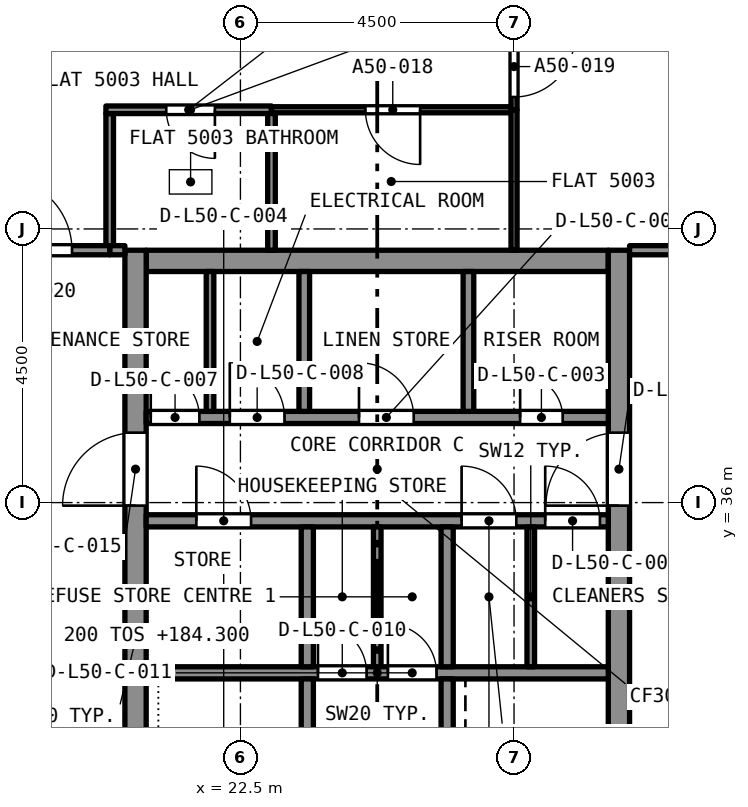
"""IFC4 building model, lengths in metres.
Left out: names, types, materials, properties, quantities, classifications, styles, units other than length and angle.
Written with IfcOpenShell. Run it as: python <this file> out.ifc"""

import sys

from ifc_helpers import new_model, si_unit, direction, frame, frame_2d, origin, place, context, subcontext, project, spatial, rectangle, extrude, element, fill, save


model = new_model("IFC4")
c1 = context("Model", 3, precision=1e-05, world=origin(), true_north=direction((0.0, 1.0)))
c2 = subcontext(c1, "Body", "Model", "MODEL_VIEW")
j1 = project(units=[si_unit("LENGTHUNIT", "METRE"), si_unit("PLANEANGLEUNIT", "RADIAN")], contexts=[c1])
p1 = place(None, origin())
s1 = spatial("IfcSite", under=j1, at=p1, CompositionType="ELEMENT")
p2 = place(p1, origin())
s2 = spatial("IfcBuilding", under=s1, at=p2, CompositionType="ELEMENT")
p3 = place(p2, frame((0.0, 0.0, 182.7)))
s3 = spatial("IfcBuildingStorey", under=s2, at=p3, CompositionType="ELEMENT", Elevation=182.7)
p4 = place(p3, frame((20.95, 39.975, 0.0), z_axis=(0.0, 0.0, 1.0), x_axis=(1.0, 0.0, 0.0)))
e1 = element("IfcWall", 1, at=p4, inside=s3, PredefinedType="SOLIDWALL", context=c2, shape_type="SweptSolid", body=[
    extrude(rectangle(XDim=7.6, YDim=0.35, at=frame_2d((3.8, 0.0))), origin(), (0.0, 0.0, 1.0), 3.2),
])
p5 = place(p3, frame((20.775, 27.35, 0.0), z_axis=(0.0, 0.0, 1.0), x_axis=(0.0, 1.0, 0.0)))
e2 = element("IfcWall", 2, at=p5, inside=s3, PredefinedType="SOLIDWALL", context=c2, shape_type="SweptSolid", body=[
    extrude(rectangle(XDim=12.8, YDim=0.35, at=frame_2d((6.4, 0.0))), origin(), (0.0, 0.0, 1.0), 3.2),
])
p6 = place(p5, frame((8.6, 0.0, 0.0)))
e3 = element("IfcOpeningElement", 3, at=p6, cuts=e2, PredefinedType="OPENING", context=c2, shape_type="SweptSolid", body=[
    extrude(rectangle(XDim=1.2, YDim=2.1, at=frame_2d((0.6, 1.05))), frame((0.0, 0.185, 0.0), z_axis=(0.0, -1.0, 0.0), x_axis=(1.0, 0.0, 0.0)), (0.0, 0.0, 1.0), 0.37),
])
p7 = place(p3, frame((28.725, 27.35, 0.0), z_axis=(0.0, 0.0, 1.0), x_axis=(0.0, 1.0, 0.0)))
e4 = element("IfcWall", 4, at=p7, inside=s3, PredefinedType="SOLIDWALL", context=c2, shape_type="SweptSolid", body=[
    extrude(rectangle(XDim=12.8, YDim=0.35, at=frame_2d((6.4, 0.0))), origin(), (0.0, 0.0, 1.0), 3.2),
])
p8 = place(p7, frame((8.6, 0.0, 0.0)))
e5 = element("IfcOpeningElement", 5, at=p8, cuts=e4, PredefinedType="OPENING", context=c2, shape_type="SweptSolid", body=[
    extrude(rectangle(XDim=1.2, YDim=2.1, at=frame_2d((0.6, 1.05))), frame((0.0, 0.185, 0.0), z_axis=(0.0, -1.0, 0.0), x_axis=(1.0, 0.0, 0.0)), (0.0, 0.0, 1.0), 0.37),
])
p9 = place(p3, frame((20.35, 40.225, 0.0), z_axis=(0.0, 0.0, 1.0), x_axis=(0.0, 1.0, 0.0)))
e6 = element("IfcWall", 6, at=p9, inside=s3, PredefinedType="PARTITIONING", context=c2, shape_type="SweptSolid", body=[
    extrude(rectangle(XDim=2.172, YDim=0.125, at=frame_2d((1.086, 0.0))), origin(), (0.0, 0.0, 1.0), 2.75),
])
p10 = place(p3, frame((23.011, 42.46, 0.0), z_axis=(0.0, 0.0, 1.0), x_axis=(-1.0, 0.0, 0.0)))
e7 = element("IfcWall", 7, at=p10, inside=s3, PredefinedType="PARTITIONING", context=c2, shape_type="SweptSolid", body=[
    extrude(rectangle(XDim=2.723, YDim=0.125, at=frame_2d((1.362, 0.0))), origin(), (0.0, 0.0, 1.0), 2.75),
])
p11 = place(p10, frame((0.93, 0.0, 0.0)))
e8 = element("IfcOpeningElement", 8, at=p11, cuts=e7, PredefinedType="OPENING", context=c2, shape_type="SweptSolid", body=[
    extrude(rectangle(XDim=0.8, YDim=2.1, at=frame_2d((0.4, 1.05))), frame((0.0, 0.073, 0.0), z_axis=(0.0, -1.0, 0.0), x_axis=(1.0, 0.0, 0.0)), (0.0, 0.0, 1.0), 0.145),
])
p12 = place(p3, frame((23.011, 40.15, 0.0), z_axis=(0.0, 0.0, 1.0), x_axis=(0.0, 1.0, 0.0)))
e9 = element("IfcWall", 9, at=p12, inside=s3, PredefinedType="PARTITIONING", context=c2, shape_type="SweptSolid", body=[
    extrude(rectangle(XDim=2.248, YDim=0.125, at=frame_2d((1.124, 0.0))), origin(), (0.0, 0.0, 1.0), 2.75),
])
p13 = place(p3, frame((20.35, 40.15, 0.0), z_axis=(0.0, 0.0, 1.0), x_axis=(1.0, 0.0, 0.0)))
e10 = element("IfcWall", 10, at=p13, inside=s3, PredefinedType="PARTITIONING", context=c2, shape_type="SweptSolid", body=[
    extrude(rectangle(XDim=0.25, YDim=0.15, at=frame_2d((0.125, 0.0))), origin(), (0.0, 0.0, 1.0), 2.75),
])
p14 = place(p3, frame((26.95, 42.46, 0.0), z_axis=(0.0, 0.0, 1.0), x_axis=(-1.0, 0.0, 0.0)))
e11 = element("IfcWall", 11, at=p14, inside=s3, PredefinedType="PARTITIONING", context=c2, shape_type="SweptSolid", body=[
    extrude(rectangle(XDim=3.939, YDim=0.1, at=frame_2d((1.97, 0.0))), origin(), (0.0, 0.0, 1.0), 2.75),
])
p15 = place(p14, frame((1.495, 0.0, 0.0)))
e12 = element("IfcOpeningElement", 12, at=p15, cuts=e11, PredefinedType="OPENING", context=c2, shape_type="SweptSolid", body=[
    extrude(rectangle(XDim=0.9, YDim=2.1, at=frame_2d((0.45, 1.05))), frame((0.0, 0.06, 0.0), z_axis=(0.0, -1.0, 0.0), x_axis=(1.0, 0.0, 0.0)), (0.0, 0.0, 1.0), 0.12),
])
p16 = place(p3, frame((27.0, 43.88, 0.0), z_axis=(0.0, 0.0, 1.0), x_axis=(0.0, -1.0, 0.0)))
e13 = element("IfcWall", 13, at=p16, inside=s3, PredefinedType="PARTITIONING", context=c2, shape_type="SweptSolid", body=[
    extrude(rectangle(XDim=1.42, YDim=0.1, at=frame_2d((0.71, 0.0))), origin(), (0.0, 0.0, 1.0), 2.75),
])
p17 = place(p16, frame((0.21, 0.0, 0.0)))
e14 = element("IfcOpeningElement", 14, at=p17, cuts=e13, PredefinedType="OPENING", context=c2, shape_type="SweptSolid", body=[
    extrude(rectangle(XDim=1.0, YDim=2.1, at=frame_2d((0.5, 1.05))), frame((0.0, 0.06, 0.0), z_axis=(0.0, -1.0, 0.0), x_axis=(1.0, 0.0, 0.0)), (0.0, 0.0, 1.0), 0.12),
])
p18 = place(p3, frame((18.4, 40.15, 0.0), z_axis=(0.0, 0.0, 1.0), x_axis=(1.0, 0.0, 0.0)))
e15 = element("IfcWall", 15, at=p18, inside=s3, PredefinedType="PARTITIONING", context=c2, shape_type="SweptSolid", body=[
    extrude(rectangle(XDim=1.95, YDim=0.15, at=frame_2d((0.975, 0.0))), origin(), (0.0, 0.0, 1.0), 2.75),
])
p19 = place(p18, frame((0.13, 0.0, 0.0)))
e16 = element("IfcOpeningElement", 16, at=p19, cuts=e15, PredefinedType="OPENING", context=c2, shape_type="SweptSolid", body=[
    extrude(rectangle(XDim=1.2, YDim=2.4, at=frame_2d((0.6, 1.2))), frame((0.0, 0.085, 0.0), z_axis=(0.0, -1.0, 0.0), x_axis=(1.0, 0.0, 0.0)), (0.0, 0.0, 1.0), 0.17),
])
p20 = place(p3, frame((27.0, 40.15, 0.0), z_axis=(0.0, 0.0, 1.0), x_axis=(0.0, 1.0, 0.0)))
e17 = element("IfcWall", 17, at=p20, inside=s3, PredefinedType="PARTITIONING", context=c2, shape_type="SweptSolid", body=[
    extrude(rectangle(XDim=2.31, YDim=0.1, at=frame_2d((1.155, 0.0))), origin(), (0.0, 0.0, 1.0), 2.75),
])
p21 = place(p3, frame((28.9, 40.15, 0.0), z_axis=(0.0, 0.0, 1.0), x_axis=(1.0, 0.0, 0.0)))
e18 = element("IfcWall", 18, at=p21, inside=s3, PredefinedType="PARTITIONING", context=c2, shape_type="SweptSolid", body=[
    extrude(rectangle(XDim=2.2, YDim=0.15, at=frame_2d((1.1, 0.0))), origin(), (0.0, 0.0, 1.0), 2.75),
])
p22 = place(p3, frame((20.95, 33.2, 0.0), z_axis=(0.0, 0.0, 1.0), x_axis=(1.0, 0.0, 0.0)))
e19 = element("IfcWall", 19, at=p22, inside=s3, PredefinedType="SOLIDWALL", context=c2, shape_type="SweptSolid", body=[
    extrude(rectangle(XDim=7.6, YDim=0.2, at=frame_2d((3.8, 0.0))), origin(), (0.0, 0.0, 1.0), 2.9),
])
p23 = place(p22, frame((2.825, 0.0, 0.0)))
e20 = element("IfcOpeningElement", 20, at=p23, cuts=e19, PredefinedType="OPENING", context=c2, shape_type="SweptSolid", body=[
    extrude(rectangle(XDim=0.8, YDim=2.1, at=frame_2d((0.4, 1.05))), frame((0.0, 0.11, 0.0), z_axis=(0.0, -1.0, 0.0), x_axis=(1.0, 0.0, 0.0)), (0.0, 0.0, 1.0), 0.22),
])
p24 = place(p22, frame((3.975, 0.0, 0.0)))
e21 = element("IfcOpeningElement", 21, at=p24, cuts=e19, PredefinedType="OPENING", context=c2, shape_type="SweptSolid", body=[
    extrude(rectangle(XDim=0.8, YDim=2.1, at=frame_2d((0.4, 1.05))), frame((0.0, 0.11, 0.0), z_axis=(0.0, -1.0, 0.0), x_axis=(1.0, 0.0, 0.0)), (0.0, 0.0, 1.0), 0.22),
])
p25 = place(p3, frame((20.95, 35.7, 0.0), z_axis=(0.0, 0.0, 1.0), x_axis=(1.0, 0.0, 0.0)))
e22 = element("IfcWall", 22, at=p25, inside=s3, PredefinedType="SOLIDWALL", context=c2, shape_type="SweptSolid", body=[
    extrude(rectangle(XDim=7.6, YDim=0.2, at=frame_2d((3.8, 0.0))), origin(), (0.0, 0.0, 1.0), 2.9),
])
p26 = place(p25, frame((0.825, 0.0, 0.0)))
e23 = element("IfcOpeningElement", 23, at=p26, cuts=e22, PredefinedType="OPENING", context=c2, shape_type="SweptSolid", body=[
    extrude(rectangle(XDim=0.9, YDim=2.1, at=frame_2d((0.45, 1.05))), frame((0.0, 0.11, 0.0), z_axis=(0.0, -1.0, 0.0), x_axis=(1.0, 0.0, 0.0)), (0.0, 0.0, 1.0), 0.22),
])
p27 = place(p25, frame((5.188, 0.0, 0.0)))
e24 = element("IfcOpeningElement", 24, at=p27, cuts=e22, PredefinedType="OPENING", context=c2, shape_type="SweptSolid", body=[
    extrude(rectangle(XDim=0.9, YDim=2.1, at=frame_2d((0.45, 1.05))), frame((0.0, 0.11, 0.0), z_axis=(0.0, -1.0, 0.0), x_axis=(1.0, 0.0, 0.0)), (0.0, 0.0, 1.0), 0.22),
])
p28 = place(p25, frame((6.562, 0.0, 0.0)))
e25 = element("IfcOpeningElement", 25, at=p28, cuts=e22, PredefinedType="OPENING", context=c2, shape_type="SweptSolid", body=[
    extrude(rectangle(XDim=0.9, YDim=2.1, at=frame_2d((0.45, 1.05))), frame((0.0, 0.11, 0.0), z_axis=(0.0, -1.0, 0.0), x_axis=(1.0, 0.0, 0.0)), (0.0, 0.0, 1.0), 0.22),
])
p29 = place(p3, frame((20.95, 37.4, 0.0), z_axis=(0.0, 0.0, 1.0), x_axis=(1.0, 0.0, 0.0)))
e26 = element("IfcWall", 26, at=p29, inside=s3, PredefinedType="SOLIDWALL", context=c2, shape_type="SweptSolid", body=[
    extrude(rectangle(XDim=7.6, YDim=0.2, at=frame_2d((3.8, 0.0))), origin(), (0.0, 0.0, 1.0), 2.9),
])
p30 = place(p29, frame((6.15, 0.0, 0.0)))
e27 = element("IfcOpeningElement", 27, at=p30, cuts=e26, PredefinedType="OPENING", context=c2, shape_type="SweptSolid", body=[
    extrude(rectangle(XDim=0.7, YDim=2.1, at=frame_2d((0.35, 1.05))), frame((0.0, 0.11, 0.0), z_axis=(0.0, -1.0, 0.0), x_axis=(1.0, 0.0, 0.0)), (0.0, 0.0, 1.0), 0.22),
])
p31 = place(p29, frame((0.075, 0.0, 0.0)))
e28 = element("IfcOpeningElement", 28, at=p31, cuts=e26, PredefinedType="OPENING", context=c2, shape_type="SweptSolid", body=[
    extrude(rectangle(XDim=0.8, YDim=2.1, at=frame_2d((0.4, 1.05))), frame((0.0, 0.11, 0.0), z_axis=(0.0, -1.0, 0.0), x_axis=(1.0, 0.0, 0.0)), (0.0, 0.0, 1.0), 0.22),
])
p32 = place(p29, frame((1.375, 0.0, 0.0)))
e29 = element("IfcOpeningElement", 29, at=p32, cuts=e26, PredefinedType="OPENING", context=c2, shape_type="SweptSolid", body=[
    extrude(rectangle(XDim=0.9, YDim=2.1, at=frame_2d((0.45, 1.05))), frame((0.0, 0.11, 0.0), z_axis=(0.0, -1.0, 0.0), x_axis=(1.0, 0.0, 0.0)), (0.0, 0.0, 1.0), 0.22),
])
p33 = place(p29, frame((3.5, 0.0, 0.0)))
e30 = element("IfcOpeningElement", 30, at=p33, cuts=e26, PredefinedType="OPENING", context=c2, shape_type="SweptSolid", body=[
    extrude(rectangle(XDim=0.9, YDim=2.1, at=frame_2d((0.45, 1.05))), frame((0.0, 0.11, 0.0), z_axis=(0.0, -1.0, 0.0), x_axis=(1.0, 0.0, 0.0)), (0.0, 0.0, 1.0), 0.22),
])
p34 = place(p3, frame((23.6, 27.7, 0.0), z_axis=(0.0, 0.0, 1.0), x_axis=(0.0, 1.0, 0.0)))
e31 = element("IfcWall", 31, at=p34, inside=s3, PredefinedType="SOLIDWALL", context=c2, shape_type="SweptSolid", body=[
    extrude(rectangle(XDim=5.4, YDim=0.2, at=frame_2d((2.7, 0.0))), origin(), (0.0, 0.0, 1.0), 2.9),
])
p35 = place(p34, frame((0.2, 0.0, 0.0)))
e32 = element("IfcOpeningElement", 32, at=p35, cuts=e31, PredefinedType="OPENING", context=c2, shape_type="SweptSolid", body=[
    extrude(rectangle(XDim=0.9, YDim=2.1, at=frame_2d((0.45, 1.05))), frame((0.0, 0.11, 0.0), z_axis=(0.0, -1.0, 0.0), x_axis=(1.0, 0.0, 0.0)), (0.0, 0.0, 1.0), 0.22),
])
p36 = place(p3, frame((25.9, 27.7, 0.0), z_axis=(0.0, 0.0, 1.0), x_axis=(0.0, 1.0, 0.0)))
e33 = element("IfcWall", 33, at=p36, inside=s3, PredefinedType="SOLIDWALL", context=c2, shape_type="SweptSolid", body=[
    extrude(rectangle(XDim=5.4, YDim=0.2, at=frame_2d((2.7, 0.0))), origin(), (0.0, 0.0, 1.0), 2.9),
])
p37 = place(p36, frame((0.2, 0.0, 0.0)))
e34 = element("IfcOpeningElement", 34, at=p37, cuts=e33, PredefinedType="OPENING", context=c2, shape_type="SweptSolid", body=[
    extrude(rectangle(XDim=0.9, YDim=2.1, at=frame_2d((0.45, 1.05))), frame((0.0, 0.11, 0.0), z_axis=(0.0, -1.0, 0.0), x_axis=(1.0, 0.0, 0.0)), (0.0, 0.0, 1.0), 0.22),
])
for number, where, z_axis, x_axis in (
    (35, (23.6, 33.3, 0.0), (0.0, 0.0, 1.0), (0.0, 1.0, 0.0)),
    (36, (25.9, 33.3, 0.0), (0.0, 0.0, 1.0), (0.0, 1.0, 0.0)),
):
    element("IfcWall", number, at=place(p3, frame(where, z_axis=z_axis, x_axis=x_axis)), inside=s3, PredefinedType="SOLIDWALL", context=c2, shape_type="SweptSolid", body=[
        extrude(rectangle(XDim=2.3, YDim=0.2, at=frame_2d((1.15, 0.0))), origin(), (0.0, 0.0, 1.0), 2.9),
    ])
for number, where, z_axis, x_axis in (
    (37, (23.55, 37.5, 0.0), (0.0, 0.0, 1.0), (0.0, 1.0, 0.0)),
    (38, (26.25, 37.5, 0.0), (0.0, 0.0, 1.0), (0.0, 1.0, 0.0)),
):
    element("IfcWall", number, at=place(p3, frame(where, z_axis=z_axis, x_axis=x_axis)), inside=s3, PredefinedType="SOLIDWALL", context=c2, shape_type="SweptSolid", body=[
        extrude(rectangle(XDim=2.3, YDim=0.175, at=frame_2d((1.15, 0.0))), origin(), (0.0, 0.0, 1.0), 2.9),
    ])
for number, where, z_axis, x_axis in (
    (39, (27.275, 33.3, 0.0), (0.0, 0.0, 1.0), (0.0, 1.0, 0.0)),
    (40, (22.0, 37.5, 0.0), (0.0, 0.0, 1.0), (0.0, 1.0, 0.0)),
    (41, (24.75, 33.3, 0.0), (0.0, 0.0, 1.0), (0.0, 1.0, 0.0)),
):
    element("IfcWall", number, at=place(p3, frame(where, z_axis=z_axis, x_axis=x_axis)), inside=s3, PredefinedType="PARTITIONING", context=c2, shape_type="SweptSolid", body=[
        extrude(rectangle(XDim=2.3, YDim=0.125, at=frame_2d((1.15, 0.0))), origin(), (0.0, 0.0, 1.0), 2.9),
    ])
p38 = place(p11, origin())
e42 = element("IfcDoor", 42, at=p38, inside=s3, OperationType="SINGLE_SWING_LEFT", PredefinedType="DOOR", context=c2, shape_type="SweptSolid", body=[
    extrude(rectangle(XDim=0.8, YDim=2.1, at=frame_2d((0.4, 1.05))), frame((0.0, 0.025, 0.0), z_axis=(0.0, -1.0, 0.0), x_axis=(1.0, 0.0, 0.0)), (0.0, 0.0, 1.0), 0.05),
])
fill(e8, e42)
p39 = place(p15, origin())
e43 = element("IfcDoor", 43, at=p39, inside=s3, OperationType="SINGLE_SWING_LEFT", PredefinedType="DOOR", context=c2, shape_type="SweptSolid", body=[
    extrude(rectangle(XDim=0.9, YDim=2.1, at=frame_2d((0.45, 1.05))), frame((0.0, 0.025, 0.0), z_axis=(0.0, -1.0, 0.0), x_axis=(1.0, 0.0, 0.0)), (0.0, 0.0, 1.0), 0.05),
])
fill(e12, e43)
p40 = place(p17, origin())
e44 = element("IfcDoor", 44, at=p40, inside=s3, OperationType="SINGLE_SWING_RIGHT", PredefinedType="DOOR", context=c2, shape_type="SweptSolid", body=[
    extrude(rectangle(XDim=1.0, YDim=2.1, at=frame_2d((0.5, 1.05))), frame((0.0, 0.025, 0.0), z_axis=(0.0, -1.0, 0.0), x_axis=(1.0, 0.0, 0.0)), (0.0, 0.0, 1.0), 0.05),
])
fill(e14, e44)
p41 = place(p19, origin())
e45 = element("IfcDoor", 45, at=p41, inside=s3, OperationType="SINGLE_SWING_LEFT", PredefinedType="DOOR", context=c2, shape_type="SweptSolid", body=[
    extrude(rectangle(XDim=1.2, YDim=2.4, at=frame_2d((0.6, 1.2))), frame((0.0, 0.025, 0.0), z_axis=(0.0, -1.0, 0.0), x_axis=(1.0, 0.0, 0.0)), (0.0, 0.0, 1.0), 0.05),
])
fill(e16, e45)
p42 = place(p30, origin())
e46 = element("IfcDoor", 46, at=p42, inside=s3, OperationType="SINGLE_SWING_LEFT", PredefinedType="DOOR", context=c2, shape_type="SweptSolid", body=[
    extrude(rectangle(XDim=0.7, YDim=2.1, at=frame_2d((0.35, 1.05))), frame((0.0, 0.025, 0.0), z_axis=(0.0, -1.0, 0.0), x_axis=(1.0, 0.0, 0.0)), (0.0, 0.0, 1.0), 0.05),
])
fill(e27, e46)
p43 = place(p26, origin())
e47 = element("IfcDoor", 47, at=p43, inside=s3, OperationType="SINGLE_SWING_LEFT", PredefinedType="DOOR", context=c2, shape_type="SweptSolid", body=[
    extrude(rectangle(XDim=0.9, YDim=2.1, at=frame_2d((0.45, 1.05))), frame((0.0, 0.025, 0.0), z_axis=(0.0, -1.0, 0.0), x_axis=(1.0, 0.0, 0.0)), (0.0, 0.0, 1.0), 0.05),
])
fill(e23, e47)
p44 = place(p27, origin())
e48 = element("IfcDoor", 48, at=p44, inside=s3, OperationType="SINGLE_SWING_LEFT", PredefinedType="DOOR", context=c2, shape_type="SweptSolid", body=[
    extrude(rectangle(XDim=0.9, YDim=2.1, at=frame_2d((0.45, 1.05))), frame((0.0, 0.025, 0.0), z_axis=(0.0, -1.0, 0.0), x_axis=(1.0, 0.0, 0.0)), (0.0, 0.0, 1.0), 0.05),
])
fill(e24, e48)
p45 = place(p28, origin())
e49 = element("IfcDoor", 49, at=p45, inside=s3, OperationType="SINGLE_SWING_LEFT", PredefinedType="DOOR", context=c2, shape_type="SweptSolid", body=[
    extrude(rectangle(XDim=0.9, YDim=2.1, at=frame_2d((0.45, 1.05))), frame((0.0, 0.025, 0.0), z_axis=(0.0, -1.0, 0.0), x_axis=(1.0, 0.0, 0.0)), (0.0, 0.0, 1.0), 0.05),
])
fill(e25, e49)
p46 = place(p31, origin())
e50 = element("IfcDoor", 50, at=p46, inside=s3, OperationType="SINGLE_SWING_LEFT", PredefinedType="DOOR", context=c2, shape_type="SweptSolid", body=[
    extrude(rectangle(XDim=0.8, YDim=2.1, at=frame_2d((0.4, 1.05))), frame((0.0, 0.025, 0.0), z_axis=(0.0, -1.0, 0.0), x_axis=(1.0, 0.0, 0.0)), (0.0, 0.0, 1.0), 0.05),
])
fill(e28, e50)
p47 = place(p32, origin())
e51 = element("IfcDoor", 51, at=p47, inside=s3, OperationType="SINGLE_SWING_LEFT", PredefinedType="DOOR", context=c2, shape_type="SweptSolid", body=[
    extrude(rectangle(XDim=0.9, YDim=2.1, at=frame_2d((0.45, 1.05))), frame((0.0, 0.025, 0.0), z_axis=(0.0, -1.0, 0.0), x_axis=(1.0, 0.0, 0.0)), (0.0, 0.0, 1.0), 0.05),
])
fill(e29, e51)
p48 = place(p33, origin())
e52 = element("IfcDoor", 52, at=p48, inside=s3, OperationType="SINGLE_SWING_LEFT", PredefinedType="DOOR", context=c2, shape_type="SweptSolid", body=[
    extrude(rectangle(XDim=0.9, YDim=2.1, at=frame_2d((0.45, 1.05))), frame((0.0, 0.025, 0.0), z_axis=(0.0, -1.0, 0.0), x_axis=(1.0, 0.0, 0.0)), (0.0, 0.0, 1.0), 0.05),
])
fill(e30, e52)
p49 = place(p23, origin())
e53 = element("IfcDoor", 53, at=p49, inside=s3, OperationType="SINGLE_SWING_LEFT", PredefinedType="DOOR", context=c2, shape_type="SweptSolid", body=[
    extrude(rectangle(XDim=0.8, YDim=2.1, at=frame_2d((0.4, 1.05))), frame((0.0, 0.025, 0.0), z_axis=(0.0, -1.0, 0.0), x_axis=(1.0, 0.0, 0.0)), (0.0, 0.0, 1.0), 0.05),
])
fill(e20, e53)
p50 = place(p24, origin())
e54 = element("IfcDoor", 54, at=p50, inside=s3, OperationType="SINGLE_SWING_LEFT", PredefinedType="DOOR", context=c2, shape_type="SweptSolid", body=[
    extrude(rectangle(XDim=0.8, YDim=2.1, at=frame_2d((0.4, 1.05))), frame((0.0, 0.025, 0.0), z_axis=(0.0, -1.0, 0.0), x_axis=(1.0, 0.0, 0.0)), (0.0, 0.0, 1.0), 0.05),
])
fill(e21, e54)
p51 = place(p6, origin())
e55 = element("IfcDoor", 55, at=p51, inside=s3, OperationType="SINGLE_SWING_LEFT", PredefinedType="DOOR", context=c2, shape_type="SweptSolid", body=[
    extrude(rectangle(XDim=1.2, YDim=2.1, at=frame_2d((0.6, 1.05))), frame((0.0, 0.025, 0.0), z_axis=(0.0, -1.0, 0.0), x_axis=(1.0, 0.0, 0.0)), (0.0, 0.0, 1.0), 0.05),
])
fill(e3, e55)
p52 = place(p8, origin())
e56 = element("IfcDoor", 56, at=p52, inside=s3, OperationType="SINGLE_SWING_LEFT", PredefinedType="DOOR", context=c2, shape_type="SweptSolid", body=[
    extrude(rectangle(XDim=1.2, YDim=2.1, at=frame_2d((0.6, 1.05))), frame((0.0, 0.025, 0.0), z_axis=(0.0, -1.0, 0.0), x_axis=(1.0, 0.0, 0.0)), (0.0, 0.0, 1.0), 0.05),
])
fill(e5, e56)
save(model, sys.argv[1])
